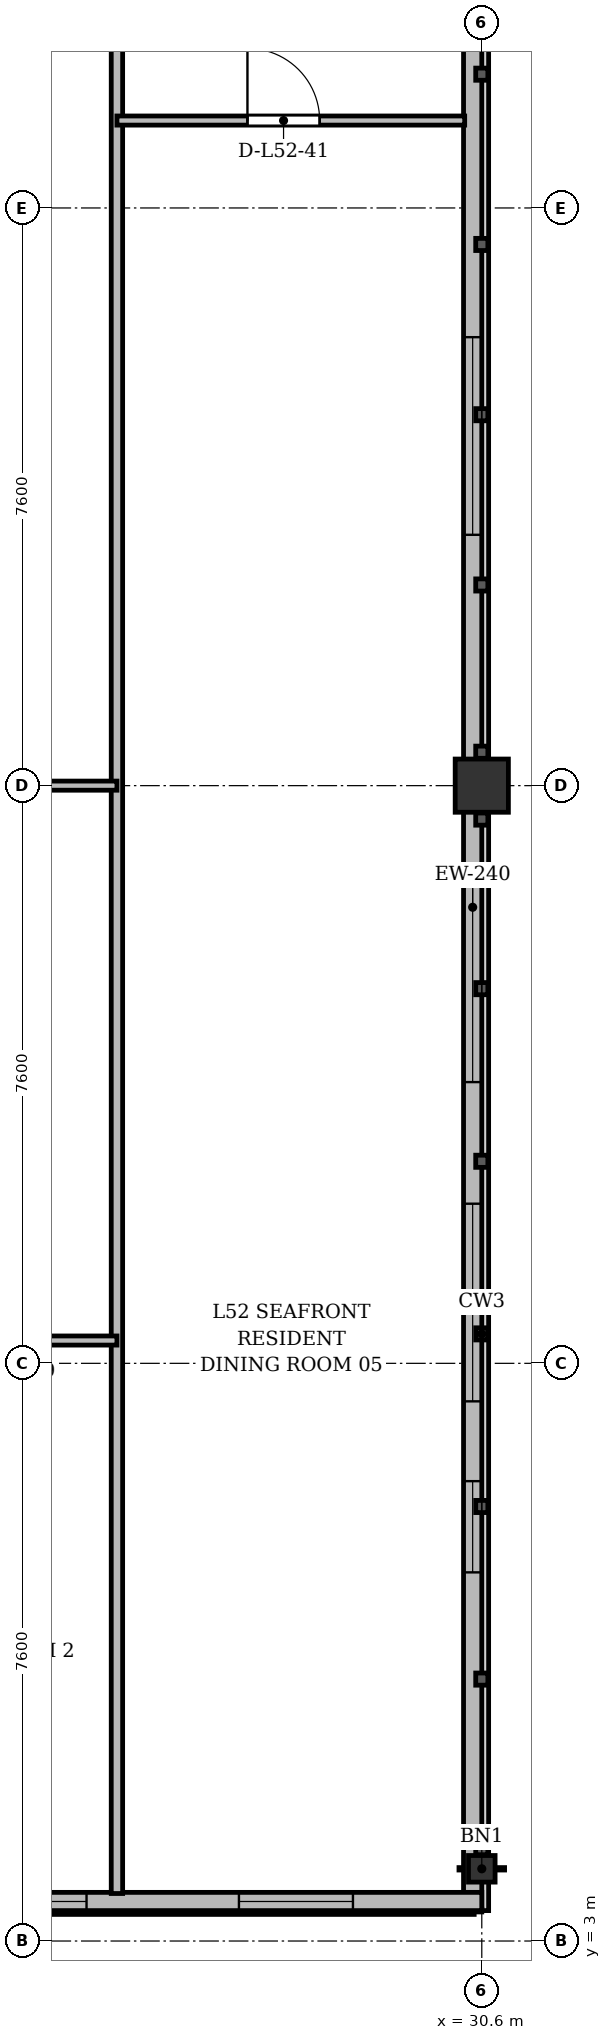
"""IFC4 building model, lengths in metres.
Left out: names, types, materials, properties, quantities, classifications, styles, units other than length and angle.
Written with IfcOpenShell. Run it as: python <this file> out.ifc"""

import sys

from ifc_helpers import new_model, si_unit, direction, frame, frame_2d, origin, origin_2d, place, context, subcontext, project, spatial, rectangle, i_section, extrude, source, transform, mapped, element, fill, save


model = new_model("IFC4")
c1 = context("Model", 3, precision=1e-05, world=origin(), true_north=direction((0.0, 1.0)))
c2 = subcontext(c1, "Body", "Model", "MODEL_VIEW")
j1 = project(units=[si_unit("LENGTHUNIT", "METRE"), si_unit("PLANEANGLEUNIT", "RADIAN")], contexts=[c1])
p1 = place(None, origin())
s1 = spatial("IfcSite", under=j1, at=p1, CompositionType="ELEMENT")
p2 = place(p1, origin())
s2 = spatial("IfcBuilding", under=s1, at=p2, CompositionType="ELEMENT")
p3 = place(p2, frame((0.0, 0.0, 201.3)))
s3 = spatial("IfcBuildingStorey", under=s2, at=p3, CompositionType="ELEMENT", Elevation=201.3)
m1 = source(origin(), c2, "Body", "SweptSolid", [
    extrude(i_section(OverallWidth=0.35, OverallDepth=0.35, WebThickness=0.018, FlangeThickness=0.028, at=origin_2d()), origin(), (0.0, 0.0, 1.0), 3.6),
])
p4 = place(p3, frame((30.6, 3.95, 0.0), z_axis=(0.0, 0.0, 1.0), x_axis=(1.0, 0.0, 0.0)))
e1 = element("IfcColumn", 1, at=p4, inside=s3, PredefinedType="COLUMN", context=c2, shape_type="MappedRepresentation", body=[
    mapped(m1, transform((0.0, 0.0, 0.0), x_axis=(1.0, 0.0, 0.0), y_axis=(0.0, 1.0, 0.0), z_axis=(0.0, 0.0, 1.0), scale=1.0)),
])
m2 = source(origin(), c2, "Body", "SweptSolid", [
    extrude(rectangle(XDim=0.7, YDim=0.7, at=origin_2d()), origin(), (0.0, 0.0, 1.0), 3.6),
])
p5 = place(p3, frame((30.6, 18.2, 0.0), z_axis=(0.0, 0.0, 1.0), x_axis=(1.0, 0.0, 0.0)))
e2 = element("IfcColumn", 2, at=p5, inside=s3, PredefinedType="COLUMN", context=c2, shape_type="MappedRepresentation", body=[
    mapped(m2, transform((0.0, 0.0, 0.0), x_axis=(1.0, 0.0, 0.0), y_axis=(0.0, 1.0, 0.0), z_axis=(0.0, 0.0, 1.0), scale=1.0)),
])
p6 = place(p3, frame((30.48, 29.8, 0.0), z_axis=(0.0, 0.0, 1.0), x_axis=(0.0, -1.0, 0.0)))
e3 = element("IfcWall", 3, at=p6, inside=s3, PredefinedType="SOLIDWALL", context=c2, shape_type="SweptSolid", body=[
    extrude(rectangle(XDim=26.4, YDim=0.24, at=frame_2d((13.2, 0.0))), origin(), (0.0, 0.0, 1.0), 2.72),
])
p7 = place(p6, frame((20.75, 0.0, 0.92)))
e4 = element("IfcOpeningElement", 4, at=p7, cuts=e3, PredefinedType="OPENING", context=c2, shape_type="SweptSolid", body=[
    extrude(rectangle(XDim=1.2, YDim=1.65, at=frame_2d((0.6, 0.825))), frame((0.0, 0.13, 0.0), z_axis=(0.0, -1.0, 0.0), x_axis=(1.0, 0.0, 0.0)), (0.0, 0.0, 1.0), 0.26),
])
p8 = place(p6, frame((17.1, 0.0, 0.92)))
e5 = element("IfcOpeningElement", 5, at=p8, cuts=e3, PredefinedType="OPENING", context=c2, shape_type="SweptSolid", body=[
    extrude(rectangle(XDim=2.6, YDim=1.7, at=frame_2d((1.3, 0.85))), frame((0.0, 0.13, 0.0), z_axis=(0.0, -1.0, 0.0), x_axis=(1.0, 0.0, 0.0)), (0.0, 0.0, 1.0), 0.26),
])
p9 = place(p6, frame((12.9, 0.0, 0.92)))
e6 = element("IfcOpeningElement", 6, at=p9, cuts=e3, PredefinedType="OPENING", context=c2, shape_type="SweptSolid", body=[
    extrude(rectangle(XDim=2.6, YDim=1.7, at=frame_2d((1.3, 0.85))), frame((0.0, 0.13, 0.0), z_axis=(0.0, -1.0, 0.0), x_axis=(1.0, 0.0, 0.0)), (0.0, 0.0, 1.0), 0.26),
])
p10 = place(p6, frame((5.7, 0.0, 0.92)))
e7 = element("IfcOpeningElement", 7, at=p10, cuts=e3, PredefinedType="OPENING", context=c2, shape_type="SweptSolid", body=[
    extrude(rectangle(XDim=2.6, YDim=1.7, at=frame_2d((1.3, 0.85))), frame((0.0, 0.13, 0.0), z_axis=(0.0, -1.0, 0.0), x_axis=(1.0, 0.0, 0.0)), (0.0, 0.0, 1.0), 0.26),
])
p11 = place(p3, frame((30.6, 3.52, 0.0), z_axis=(0.0, 0.0, 1.0), x_axis=(-1.0, 0.0, 0.0)))
e8 = element("IfcWall", 8, at=p11, inside=s3, PredefinedType="SOLIDWALL", context=c2, shape_type="SweptSolid", body=[
    extrude(rectangle(XDim=19.6, YDim=0.24, at=frame_2d((9.8, 0.0))), origin(), (0.0, 0.0, 1.0), 3.22),
])
p12 = place(p11, frame((1.695, 0.0, 0.9)))
e9 = element("IfcOpeningElement", 9, at=p12, cuts=e8, PredefinedType="OPENING", context=c2, shape_type="SweptSolid", body=[
    extrude(rectangle(XDim=1.5, YDim=1.75, at=frame_2d((0.75, 0.875))), frame((0.0, 0.13, 0.0), z_axis=(0.0, -1.0, 0.0), x_axis=(1.0, 0.0, 0.0)), (0.0, 0.0, 1.0), 0.26),
])
p13 = place(p11, frame((5.2, 0.0, 0.9)))
e10 = element("IfcOpeningElement", 10, at=p13, cuts=e8, PredefinedType="OPENING", context=c2, shape_type="SweptSolid", body=[
    extrude(rectangle(XDim=2.0, YDim=1.95, at=frame_2d((1.0, 0.975))), frame((0.0, 0.13, 0.0), z_axis=(0.0, -1.0, 0.0), x_axis=(1.0, 0.0, 0.0)), (0.0, 0.0, 1.0), 0.26),
])
p14 = place(p11, frame((8.175, 0.0, 0.9)))
e11 = element("IfcOpeningElement", 11, at=p14, cuts=e8, PredefinedType="OPENING", context=c2, shape_type="SweptSolid", body=[
    extrude(rectangle(XDim=1.65, YDim=1.85, at=frame_2d((0.825, 0.925))), frame((0.0, 0.13, 0.0), z_axis=(0.0, -1.0, 0.0), x_axis=(1.0, 0.0, 0.0)), (0.0, 0.0, 1.0), 0.26),
])
p15 = place(p11, frame((10.65, 0.0, 0.9)))
e12 = element("IfcOpeningElement", 12, at=p15, cuts=e8, PredefinedType="OPENING", context=c2, shape_type="SweptSolid", body=[
    extrude(rectangle(XDim=1.5, YDim=1.75, at=frame_2d((0.75, 0.875))), frame((0.0, 0.13, 0.0), z_axis=(0.0, -1.0, 0.0), x_axis=(1.0, 0.0, 0.0)), (0.0, 0.0, 1.0), 0.26),
])
p16 = place(p11, frame((14.1, 0.0, 0.9)))
e13 = element("IfcOpeningElement", 13, at=p16, cuts=e8, PredefinedType="OPENING", context=c2, shape_type="SweptSolid", body=[
    extrude(rectangle(XDim=2.2, YDim=1.8, at=frame_2d((1.1, 0.9))), frame((0.0, 0.13, 0.0), z_axis=(0.0, -1.0, 0.0), x_axis=(1.0, 0.0, 0.0)), (0.0, 0.0, 1.0), 0.26),
])
p17 = place(p11, frame((18.305, 0.0, 0.9)))
e14 = element("IfcOpeningElement", 14, at=p17, cuts=e8, PredefinedType="OPENING", context=c2, shape_type="SweptSolid", body=[
    extrude(rectangle(XDim=0.9, YDim=1.65, at=frame_2d((0.45, 0.825))), frame((0.0, 0.13, 0.0), z_axis=(0.0, -1.0, 0.0), x_axis=(1.0, 0.0, 0.0)), (0.0, 0.0, 1.0), 0.26),
])
p18 = place(p3, frame((25.8, 3.625, 0.0), z_axis=(0.0, 0.0, 1.0), x_axis=(0.0, 1.0, 0.0)))
e15 = element("IfcWall", 15, at=p18, inside=s3, PredefinedType="PARTITIONING", context=c2, shape_type="SweptSolid", body=[
    extrude(rectangle(XDim=27.175, YDim=0.15, at=frame_2d((13.587, 0.0))), origin(), (0.0, 0.0, 1.0), 2.77),
])
p19 = place(p3, frame((20.2, 18.2, 0.0), z_axis=(0.0, 0.0, 1.0), x_axis=(1.0, 0.0, 0.0)))
e16 = element("IfcWall", 16, at=p19, inside=s3, PredefinedType="PARTITIONING", context=c2, shape_type="SweptSolid", body=[
    extrude(rectangle(XDim=5.6, YDim=0.12, at=frame_2d((2.8, 0.0))), origin(), (0.0, 0.0, 1.0), 2.77),
])
p20 = place(p19, frame((1.306, 0.0, 0.0)))
e17 = element("IfcOpeningElement", 17, at=p20, cuts=e16, PredefinedType="OPENING", context=c2, shape_type="SweptSolid", body=[
    extrude(rectangle(XDim=0.95, YDim=2.15, at=frame_2d((0.475, 1.075))), frame((0.0, 0.07, 0.0), z_axis=(0.0, -1.0, 0.0), x_axis=(1.0, 0.0, 0.0)), (0.0, 0.0, 1.0), 0.14),
])
p21 = place(p3, frame((23.0, 10.9, 0.0), z_axis=(0.0, 0.0, 1.0), x_axis=(1.0, 0.0, 0.0)))
e18 = element("IfcWall", 18, at=p21, inside=s3, PredefinedType="PARTITIONING", context=c2, shape_type="SweptSolid", body=[
    extrude(rectangle(XDim=2.8, YDim=0.12, at=frame_2d((1.4, 0.0))), origin(), (0.0, 0.0, 1.0), 2.72),
])
p22 = place(p21, frame((0.925, 0.0, 0.0)))
e19 = element("IfcOpeningElement", 19, at=p22, cuts=e18, PredefinedType="OPENING", context=c2, shape_type="SweptSolid", body=[
    extrude(rectangle(XDim=0.95, YDim=2.15, at=frame_2d((0.475, 1.075))), frame((0.0, 0.07, 0.0), z_axis=(0.0, -1.0, 0.0), x_axis=(1.0, 0.0, 0.0)), (0.0, 0.0, 1.0), 0.14),
])
p23 = place(p3, frame((25.8, 26.95, 0.0), z_axis=(0.0, 0.0, 1.0), x_axis=(1.0, 0.0, 0.0)))
e20 = element("IfcWall", 20, at=p23, inside=s3, PredefinedType="PARTITIONING", context=c2, shape_type="SweptSolid", body=[
    extrude(rectangle(XDim=4.575, YDim=0.12, at=frame_2d((2.288, 0.0))), origin(), (0.0, 0.0, 1.0), 3.22),
])
p24 = place(p23, frame((1.717, 0.0, 0.0)))
e21 = element("IfcOpeningElement", 21, at=p24, cuts=e20, PredefinedType="OPENING", context=c2, shape_type="SweptSolid", body=[
    extrude(rectangle(XDim=0.95, YDim=2.15, at=frame_2d((0.475, 1.075))), frame((0.0, 0.07, 0.0), z_axis=(0.0, -1.0, 0.0), x_axis=(1.0, 0.0, 0.0)), (0.0, 0.0, 1.0), 0.14),
])
m3 = source(origin(), c2, "Body", "SweptSolid", [
    extrude(rectangle(XDim=1.2, YDim=1.65, at=frame_2d((0.6, 0.825))), frame((0.0, 0.03, 0.0), z_axis=(0.0, -1.0, 0.0), x_axis=(1.0, 0.0, 0.0)), (0.0, 0.0, 1.0), 0.06),
])
p25 = place(p7, origin())
e22 = element("IfcWindow", 22, at=p25, inside=s3, PartitioningType="SINGLE_PANEL", PredefinedType="WINDOW", context=c2, shape_type="MappedRepresentation", body=[
    mapped(m3, transform((0.0, 0.0, 0.0), x_axis=(1.0, 0.0, 0.0), y_axis=(0.0, 1.0, 0.0), z_axis=(0.0, 0.0, 1.0), scale=1.0)),
])
fill(e4, e22)
m4 = source(origin(), c2, "Body", "SweptSolid", [
    extrude(rectangle(XDim=2.6, YDim=1.7, at=frame_2d((1.3, 0.85))), frame((0.0, 0.03, 0.0), z_axis=(0.0, -1.0, 0.0), x_axis=(1.0, 0.0, 0.0)), (0.0, 0.0, 1.0), 0.06),
])
p26 = place(p8, origin())
e23 = element("IfcWindow", 23, at=p26, inside=s3, PartitioningType="SINGLE_PANEL", PredefinedType="WINDOW", context=c2, shape_type="MappedRepresentation", body=[
    mapped(m4, transform((0.0, 0.0, 0.0), x_axis=(1.0, 0.0, 0.0), y_axis=(0.0, 1.0, 0.0), z_axis=(0.0, 0.0, 1.0), scale=1.0)),
])
fill(e5, e23)
p27 = place(p9, origin())
e24 = element("IfcWindow", 24, at=p27, inside=s3, PartitioningType="SINGLE_PANEL", PredefinedType="WINDOW", context=c2, shape_type="MappedRepresentation", body=[
    mapped(m4, transform((0.0, 0.0, 0.0), x_axis=(1.0, 0.0, 0.0), y_axis=(0.0, 1.0, 0.0), z_axis=(0.0, 0.0, 1.0), scale=1.0)),
])
fill(e6, e24)
p28 = place(p10, origin())
e25 = element("IfcWindow", 25, at=p28, inside=s3, PartitioningType="SINGLE_PANEL", PredefinedType="WINDOW", context=c2, shape_type="MappedRepresentation", body=[
    mapped(m4, transform((0.0, 0.0, 0.0), x_axis=(1.0, 0.0, 0.0), y_axis=(0.0, 1.0, 0.0), z_axis=(0.0, 0.0, 1.0), scale=1.0)),
])
fill(e7, e25)
m5 = source(origin(), c2, "Body", "SweptSolid", [
    extrude(rectangle(XDim=1.5, YDim=1.75, at=frame_2d((0.75, 0.875))), frame((0.0, 0.03, 0.0), z_axis=(0.0, -1.0, 0.0), x_axis=(1.0, 0.0, 0.0)), (0.0, 0.0, 1.0), 0.06),
])
p29 = place(p12, origin())
e26 = element("IfcWindow", 26, at=p29, inside=s3, PartitioningType="SINGLE_PANEL", PredefinedType="WINDOW", context=c2, shape_type="MappedRepresentation", body=[
    mapped(m5, transform((0.0, 0.0, 0.0), x_axis=(1.0, 0.0, 0.0), y_axis=(0.0, 1.0, 0.0), z_axis=(0.0, 0.0, 1.0), scale=1.0)),
])
fill(e9, e26)
m6 = source(origin(), c2, "Body", "SweptSolid", [
    extrude(rectangle(XDim=2.0, YDim=1.95, at=frame_2d((1.0, 0.975))), frame((0.0, 0.03, 0.0), z_axis=(0.0, -1.0, 0.0), x_axis=(1.0, 0.0, 0.0)), (0.0, 0.0, 1.0), 0.06),
])
p30 = place(p13, origin())
e27 = element("IfcWindow", 27, at=p30, inside=s3, PartitioningType="SINGLE_PANEL", PredefinedType="WINDOW", context=c2, shape_type="MappedRepresentation", body=[
    mapped(m6, transform((0.0, 0.0, 0.0), x_axis=(1.0, 0.0, 0.0), y_axis=(0.0, 1.0, 0.0), z_axis=(0.0, 0.0, 1.0), scale=1.0)),
])
fill(e10, e27)
m7 = source(origin(), c2, "Body", "SweptSolid", [
    extrude(rectangle(XDim=0.95, YDim=2.15, at=frame_2d((0.475, 1.075))), frame((0.0, 0.025, 0.0), z_axis=(0.0, -1.0, 0.0), x_axis=(1.0, 0.0, 0.0)), (0.0, 0.0, 1.0), 0.05),
])
p31 = place(p24, origin())
e28 = element("IfcDoor", 28, at=p31, inside=s3, OperationType="SINGLE_SWING_LEFT", PredefinedType="DOOR", context=c2, shape_type="MappedRepresentation", body=[
    mapped(m7, transform((0.0, 0.0, 0.0), x_axis=(1.0, 0.0, 0.0), y_axis=(0.0, 1.0, 0.0), z_axis=(0.0, 0.0, 1.0), scale=1.0)),
])
fill(e21, e28)
save(model, sys.argv[1])
